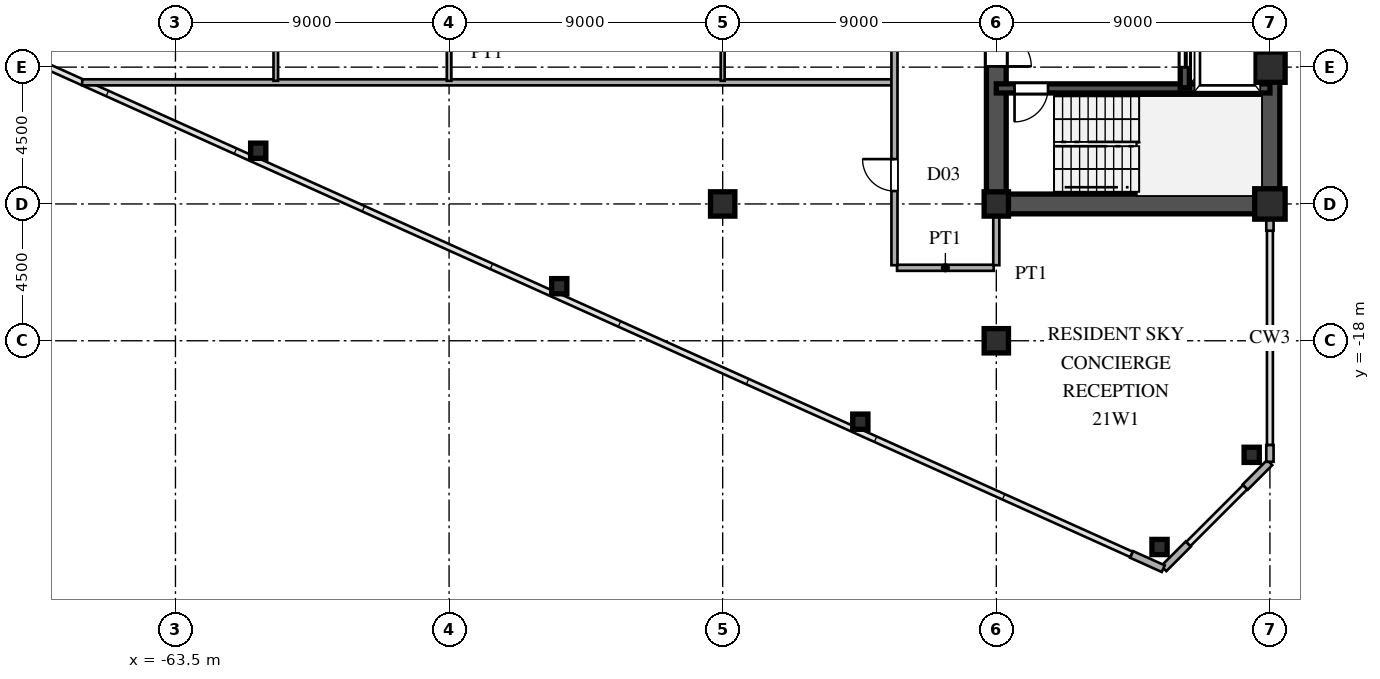
"""IFC4 building model, lengths in metres.
Left out: names, types, materials, properties, quantities, classifications, styles, units other than length and angle.
Written with IfcOpenShell. Run it as: python <this file> out.ifc"""

import sys

from ifc_helpers import new_model, si_unit, direction, frame, frame_2d, origin, origin_2d, place, context, subcontext, project, spatial, rectangle, hollow_rectangle, i_section, extrude, source, transform, mapped, element, fill, save


model = new_model("IFC4")
c1 = context("Model", 3, precision=1e-05, world=origin(), true_north=direction((0.0, 1.0)))
c2 = subcontext(c1, "Body", "Model", "MODEL_VIEW")
j1 = project(units=[si_unit("LENGTHUNIT", "METRE"), si_unit("PLANEANGLEUNIT", "RADIAN")], contexts=[c1])
p1 = place(None, origin())
s1 = spatial("IfcSite", under=j1, at=p1, CompositionType="ELEMENT")
p2 = place(p1, origin())
s2 = spatial("IfcBuilding", under=s1, at=p2, CompositionType="ELEMENT")
p3 = place(p2, frame((0.0, 0.0, 80.1)))
s3 = spatial("IfcBuildingStorey", under=s2, at=p3, CompositionType="ELEMENT", Elevation=80.1)
m1 = source(origin(), c2, "Body", "SweptSolid", [
    extrude(hollow_rectangle(XDim=1.0, YDim=1.0, WallThickness=0.042, at=origin_2d()), origin(), (0.0, 0.0, 1.0), 3.6),
])
for number, where, z_axis, x_axis in (
    (1, (-27.5, -13.5, 0.0), (0.0, 0.0, 1.0), (1.0, 0.0, 0.0)),
    (2, (-27.5, -9.0, 0.0), (0.0, 0.0, 1.0), (1.0, 0.0, 0.0)),
):
    element("IfcColumn", number, at=place(p3, frame(where, z_axis=z_axis, x_axis=x_axis)), inside=s3, PredefinedType="COLUMN", context=c2, shape_type="MappedRepresentation", body=[
        mapped(m1, transform((0.0, 0.0, 0.0), scale=1.0)),
    ])
m2 = source(origin(), c2, "Body", "SweptSolid", [
    extrude(i_section(OverallWidth=0.8, OverallDepth=0.8, WebThickness=0.032, FlangeThickness=0.05, at=origin_2d()), origin(), (0.0, 0.0, 1.0), 3.6),
])
for number, where, z_axis, x_axis in (
    (3, (-36.5, -18.0, 0.0), (0.0, 0.0, 1.0), (1.0, 0.0, 0.0)),
    (4, (-36.5, -13.5, 0.0), (0.0, 0.0, 1.0), (1.0, 0.0, 0.0)),
    (5, (-45.5, -13.5, 0.0), (0.0, 0.0, 1.0), (1.0, 0.0, 0.0)),
):
    element("IfcColumn", number, at=place(p3, frame(where, z_axis=z_axis, x_axis=x_axis)), inside=s3, PredefinedType="COLUMN", context=c2, shape_type="MappedRepresentation", body=[
        mapped(m2, transform((0.0, 0.0, 0.0), scale=1.0)),
    ])
m3 = source(origin(), c2, "Body", "SweptSolid", [
    extrude(hollow_rectangle(XDim=0.5, YDim=0.5, WallThickness=0.02, at=origin_2d()), origin(), (0.0, 0.0, 1.0), 3.6),
])
for number, where, z_axis, x_axis in (
    (6, (-28.1, -21.751, 0.0), (0.0, 0.0, 1.0), (1.0, 0.0, 0.0)),
    (7, (-31.131, -24.783, 0.0), (0.0, 0.0, 1.0), (1.0, 0.0, 0.0)),
    (8, (-40.973, -20.661, 0.0), (0.0, 0.0, 1.0), (1.0, 0.0, 0.0)),
    (9, (-50.875, -16.205, 0.0), (0.0, 0.0, 1.0), (1.0, 0.0, 0.0)),
    (10, (-60.778, -11.749, 0.0), (0.0, 0.0, 1.0), (1.0, 0.0, 0.0)),
):
    element("IfcColumn", number, at=place(p3, frame(where, z_axis=z_axis, x_axis=x_axis)), inside=s3, PredefinedType="COLUMN", context=c2, shape_type="MappedRepresentation", body=[
        mapped(m3, transform((0.0, 0.0, 0.0), scale=1.0)),
    ])
p4 = place(p3, frame((-27.5, -21.98, 0.0), z_axis=(0.0, 0.0, 1.0), x_axis=(0.0, 1.0, 0.0)))
e11 = element("IfcWall", 11, at=p4, inside=s3, PredefinedType="SOLIDWALL", context=c2, shape_type="SweptSolid", body=[
    extrude(rectangle(XDim=0.55, YDim=0.24, at=frame_2d((0.275, 0.0))), origin(), (0.0, 0.0, 1.0), 3.38),
])
p5 = place(p3, frame((-27.5, -14.38, 0.0), z_axis=(0.0, 0.0, 1.0), x_axis=(0.0, 1.0, 0.0)))
e12 = element("IfcWall", 12, at=p5, inside=s3, PredefinedType="SOLIDWALL", context=c2, shape_type="SweptSolid", body=[
    extrude(rectangle(XDim=0.55, YDim=0.24, at=frame_2d((0.275, 0.0))), origin(), (0.0, 0.0, 1.0), 2.88),
])
p6 = place(p3, frame((-32.049, -25.028, 0.0), z_axis=(0.0, 0.0, 1.0), x_axis=(0.911929519623, -0.410346866979, 0.0)))
e13 = element("IfcWall", 13, at=p6, inside=s3, PredefinedType="SOLIDWALL", context=c2, shape_type="SweptSolid", body=[
    extrude(rectangle(XDim=1.14, YDim=0.24, at=frame_2d((0.57, 0.0))), origin(), (0.0, 0.0, 1.0), 3.38),
])
for number, where, z_axis, x_axis in (
    (14, (-30.993, -25.493, 0.0), (0.0, 0.0, 1.0), (0.707, 0.707, 0.0)),
    (15, (-28.313, -22.813, 0.0), (0.0, 0.0, 1.0), (0.707, 0.707, 0.0)),
):
    element("IfcWall", number, at=place(p3, frame(where, z_axis=z_axis, x_axis=x_axis)), inside=s3, PredefinedType="SOLIDWALL", context=c2, shape_type="SweptSolid", body=[
        extrude(rectangle(XDim=1.14, YDim=0.24, at=frame_2d((0.57, 0.0))), origin(), (0.0, 0.0, 1.0), 3.38),
    ])
p7 = place(p3, frame((-27.5, -13.5, 0.0), z_axis=(0.0, 0.0, 1.0), x_axis=(0.0, 1.0, 0.0)))
e16 = element("IfcWall", 16, at=p7, inside=s3, PredefinedType="SHEAR", context=c2, shape_type="SweptSolid", body=[
    extrude(rectangle(XDim=12.2, YDim=0.65, at=frame_2d((6.1, 0.0))), origin(), (0.0, 0.0, 1.0), 3.38),
])
p8 = place(p3, frame((-36.5, -13.5, 0.0), z_axis=(0.0, 0.0, 1.0), x_axis=(1.0, 0.0, 0.0)))
e17 = element("IfcWall", 17, at=p8, inside=s3, PredefinedType="SHEAR", context=c2, shape_type="SweptSolid", body=[
    extrude(rectangle(XDim=9.0, YDim=0.65, at=frame_2d((4.5, 0.0))), origin(), (0.0, 0.0, 1.0), 3.38),
])
p9 = place(p3, frame((-36.5, -13.65, 0.0), z_axis=(0.0, 0.0, 1.0), x_axis=(0.0, 1.0, 0.0)))
e18 = element("IfcWall", 18, at=p9, inside=s3, PredefinedType="SHEAR", context=c2, shape_type="SweptSolid", body=[
    extrude(rectangle(XDim=7.15, YDim=0.65, at=frame_2d((3.575, 0.0))), origin(), (0.0, 0.0, 1.0), 3.38),
])
p10 = place(p9, frame((4.675, 0.0, 0.0)))
e19 = element("IfcOpeningElement", 19, at=p10, cuts=e18, PredefinedType="OPENING", context=c2, shape_type="SweptSolid", body=[
    extrude(rectangle(XDim=1.15, YDim=2.2, at=frame_2d((0.575, 1.1))), frame((0.0, 0.335, 0.0), z_axis=(0.0, -1.0, 0.0), x_axis=(1.0, 0.0, 0.0)), (0.0, 0.0, 1.0), 0.67),
])
p11 = place(p3, frame((-36.5, -9.7, 0.0), z_axis=(0.0, 0.0, 1.0), x_axis=(1.0, 0.0, 0.0)))
e20 = element("IfcWall", 20, at=p11, inside=s3, PredefinedType="SHEAR", context=c2, shape_type="SweptSolid", body=[
    extrude(rectangle(XDim=9.0, YDim=0.3, at=frame_2d((4.5, 0.0))), origin(), (0.0, 0.0, 1.0), 3.38),
])
p12 = place(p11, frame((0.6, 0.0, 0.0)))
e21 = element("IfcOpeningElement", 21, at=p12, cuts=e20, PredefinedType="OPENING", context=c2, shape_type="SweptSolid", body=[
    extrude(rectangle(XDim=1.1, YDim=2.2, at=frame_2d((0.55, 1.1))), frame((0.0, 0.16, 0.0), z_axis=(0.0, -1.0, 0.0), x_axis=(1.0, 0.0, 0.0)), (0.0, 0.0, 1.0), 0.32),
])
p13 = place(p3, frame((-30.3, -9.68, 0.0), z_axis=(0.0, 0.0, 1.0), x_axis=(0.0, 1.0, 0.0)))
e22 = element("IfcWall", 22, at=p13, inside=s3, PredefinedType="SHEAR", context=c2, shape_type="SweptSolid", body=[
    extrude(rectangle(XDim=2.56, YDim=0.3, at=frame_2d((1.28, 0.0))), origin(), (0.0, 0.0, 1.0), 3.38),
])
p14 = place(p13, frame((0.68, 0.0, 0.0)))
e23 = element("IfcOpeningElement", 23, at=p14, cuts=e22, PredefinedType="OPENING", context=c2, shape_type="SweptSolid", body=[
    extrude(rectangle(XDim=1.2, YDim=2.25, at=frame_2d((0.6, 1.125))), frame((0.0, 0.16, 0.0), z_axis=(0.0, -1.0, 0.0), x_axis=(1.0, 0.0, 0.0)), (0.0, 0.0, 1.0), 0.32),
])
p15 = place(p3, frame((-39.765, -15.6, 0.0), z_axis=(0.0, 0.0, 1.0), x_axis=(1.0, 0.0, 0.0)))
e24 = element("IfcWall", 24, at=p15, inside=s3, PredefinedType="PARTITIONING", context=c2, shape_type="SweptSolid", body=[
    extrude(rectangle(XDim=3.18, YDim=0.2, at=frame_2d((1.59, 0.0))), origin(), (0.0, 0.0, 1.0), 3.38),
])
p16 = place(p3, frame((-66.568, -9.5, 0.0), z_axis=(0.0, 0.0, 1.0), x_axis=(1.0, 0.0, 0.0)))
e25 = element("IfcWall", 25, at=p16, inside=s3, PredefinedType="PARTITIONING", context=c2, shape_type="SweptSolid", body=[
    extrude(rectangle(XDim=26.638, YDim=0.2, at=frame_2d((13.319, 0.0))), origin(), (0.0, 0.0, 1.0), 3.38),
])
p17 = place(p3, frame((-60.2, -9.45, 0.0), z_axis=(0.0, 0.0, 1.0), x_axis=(0.0, 1.0, 0.0)))
e26 = element("IfcWall", 26, at=p17, inside=s3, PredefinedType="PARTITIONING", context=c2, shape_type="SweptSolid", body=[
    extrude(rectangle(XDim=18.725, YDim=0.15, at=frame_2d((9.362, 0.0))), origin(), (0.0, 0.0, 1.0), 3.38),
])
p18 = place(p17, frame((1.808, 0.0, 0.0)))
e27 = element("IfcOpeningElement", 27, at=p18, cuts=e26, PredefinedType="OPENING", context=c2, shape_type="SweptSolid", body=[
    extrude(rectangle(XDim=0.95, YDim=2.15, at=frame_2d((0.475, 1.075))), frame((0.0, 0.085, 0.0), z_axis=(0.0, -1.0, 0.0), x_axis=(1.0, 0.0, 0.0)), (0.0, 0.0, 1.0), 0.17),
])
p19 = place(p17, frame((6.475, 0.0, 0.0)))
e28 = element("IfcOpeningElement", 28, at=p19, cuts=e26, PredefinedType="OPENING", context=c2, shape_type="SweptSolid", body=[
    extrude(rectangle(XDim=0.95, YDim=2.15, at=frame_2d((0.475, 1.075))), frame((0.0, 0.085, 0.0), z_axis=(0.0, -1.0, 0.0), x_axis=(1.0, 0.0, 0.0)), (0.0, 0.0, 1.0), 0.17),
])
p20 = place(p17, frame((11.142, 0.0, 0.0)))
e29 = element("IfcOpeningElement", 29, at=p20, cuts=e26, PredefinedType="OPENING", context=c2, shape_type="SweptSolid", body=[
    extrude(rectangle(XDim=0.95, YDim=2.15, at=frame_2d((0.475, 1.075))), frame((0.0, 0.085, 0.0), z_axis=(0.0, -1.0, 0.0), x_axis=(1.0, 0.0, 0.0)), (0.0, 0.0, 1.0), 0.17),
])
p21 = place(p17, frame((15.887, 0.0, 0.0)))
e30 = element("IfcOpeningElement", 30, at=p21, cuts=e26, PredefinedType="OPENING", context=c2, shape_type="SweptSolid", body=[
    extrude(rectangle(XDim=0.95, YDim=2.15, at=frame_2d((0.475, 1.075))), frame((0.0, 0.085, 0.0), z_axis=(0.0, -1.0, 0.0), x_axis=(1.0, 0.0, 0.0)), (0.0, 0.0, 1.0), 0.17),
])
p22 = place(p3, frame((-54.5, -9.45, 0.0), z_axis=(0.0, 0.0, 1.0), x_axis=(0.0, 1.0, 0.0)))
e31 = element("IfcWall", 31, at=p22, inside=s3, PredefinedType="PARTITIONING", context=c2, shape_type="SweptSolid", body=[
    extrude(rectangle(XDim=23.55, YDim=0.15, at=frame_2d((11.775, 0.0))), origin(), (0.0, 0.0, 1.0), 2.68),
])
p23 = place(p22, frame((6.475, 0.0, 0.0)))
e32 = element("IfcOpeningElement", 32, at=p23, cuts=e31, PredefinedType="OPENING", context=c2, shape_type="SweptSolid", body=[
    extrude(rectangle(XDim=0.95, YDim=2.15, at=frame_2d((0.475, 1.075))), frame((0.0, 0.085, 0.0), z_axis=(0.0, -1.0, 0.0), x_axis=(1.0, 0.0, 0.0)), (0.0, 0.0, 1.0), 0.17),
])
p24 = place(p22, frame((20.712, 0.0, 0.0)))
e33 = element("IfcOpeningElement", 33, at=p24, cuts=e31, PredefinedType="OPENING", context=c2, shape_type="SweptSolid", body=[
    extrude(rectangle(XDim=0.95, YDim=2.15, at=frame_2d((0.475, 1.075))), frame((0.0, 0.085, 0.0), z_axis=(0.0, -1.0, 0.0), x_axis=(1.0, 0.0, 0.0)), (0.0, 0.0, 1.0), 0.17),
])
p25 = place(p22, frame((15.887, 0.0, 0.0)))
e34 = element("IfcOpeningElement", 34, at=p25, cuts=e31, PredefinedType="OPENING", context=c2, shape_type="SweptSolid", body=[
    extrude(rectangle(XDim=0.95, YDim=2.15, at=frame_2d((0.475, 1.075))), frame((0.0, 0.085, 0.0), z_axis=(0.0, -1.0, 0.0), x_axis=(1.0, 0.0, 0.0)), (0.0, 0.0, 1.0), 0.17),
])
p26 = place(p3, frame((-45.5, -9.45, 0.0), z_axis=(0.0, 0.0, 1.0), x_axis=(0.0, 1.0, 0.0)))
e35 = element("IfcWall", 35, at=p26, inside=s3, PredefinedType="PARTITIONING", context=c2, shape_type="SweptSolid", body=[
    extrude(rectangle(XDim=9.233, YDim=0.13, at=frame_2d((4.616, 0.0))), origin(), (0.0, 0.0, 1.0), 2.68),
])
p27 = place(p26, frame((6.475, 0.0, 0.0)))
e36 = element("IfcOpeningElement", 36, at=p27, cuts=e35, PredefinedType="OPENING", context=c2, shape_type="SweptSolid", body=[
    extrude(rectangle(XDim=0.95, YDim=2.15, at=frame_2d((0.475, 1.075))), frame((0.0, 0.075, 0.0), z_axis=(0.0, -1.0, 0.0), x_axis=(1.0, 0.0, 0.0)), (0.0, 0.0, 1.0), 0.15),
])
p28 = place(p3, frame((-39.85, -15.515, 0.0), z_axis=(0.0, 0.0, 1.0), x_axis=(0.0, 1.0, 0.0)))
e37 = element("IfcWall", 37, at=p28, inside=s3, PredefinedType="PARTITIONING", context=c2, shape_type="SweptSolid", body=[
    extrude(rectangle(XDim=31.03, YDim=0.2, at=frame_2d((15.515, 0.0))), origin(), (0.0, 0.0, 1.0), 3.38),
])
p29 = place(p28, frame((2.44, 0.0, 0.0)))
e38 = element("IfcOpeningElement", 38, at=p29, cuts=e37, PredefinedType="OPENING", context=c2, shape_type="SweptSolid", body=[
    extrude(rectangle(XDim=1.05, YDim=2.25, at=frame_2d((0.525, 1.125))), frame((0.0, 0.11, 0.0), z_axis=(0.0, -1.0, 0.0), x_axis=(1.0, 0.0, 0.0)), (0.0, 0.0, 1.0), 0.22),
])
p30 = place(p28, frame((12.28, 0.0, 0.0)))
e39 = element("IfcOpeningElement", 39, at=p30, cuts=e37, PredefinedType="OPENING", context=c2, shape_type="SweptSolid", body=[
    extrude(rectangle(XDim=1.05, YDim=2.25, at=frame_2d((0.525, 1.125))), frame((0.0, 0.11, 0.0), z_axis=(0.0, -1.0, 0.0), x_axis=(1.0, 0.0, 0.0)), (0.0, 0.0, 1.0), 0.22),
])
p31 = place(p28, frame((25.067, 0.0, 0.0)))
e40 = element("IfcOpeningElement", 40, at=p31, cuts=e37, PredefinedType="OPENING", context=c2, shape_type="SweptSolid", body=[
    extrude(rectangle(XDim=1.05, YDim=2.25, at=frame_2d((0.525, 1.125))), frame((0.0, 0.11, 0.0), z_axis=(0.0, -1.0, 0.0), x_axis=(1.0, 0.0, 0.0)), (0.0, 0.0, 1.0), 0.22),
])
p32 = place(p3, frame((-36.5, -15.515, 0.0), z_axis=(0.0, 0.0, 1.0), x_axis=(0.0, 1.0, 0.0)))
e41 = element("IfcWall", 41, at=p32, inside=s3, PredefinedType="PARTITIONING", context=c2, shape_type="SweptSolid", body=[
    extrude(rectangle(XDim=1.685, YDim=0.2, at=frame_2d((0.842, 0.0))), origin(), (0.0, 0.0, 1.0), 2.68),
])
m4 = source(origin(), c2, "Body", "SweptSolid", [
    extrude(rectangle(XDim=1.15, YDim=2.2, at=frame_2d((0.575, 1.1))), frame((0.0, 0.025, 0.0), z_axis=(0.0, -1.0, 0.0), x_axis=(1.0, 0.0, 0.0)), (0.0, 0.0, 1.0), 0.05),
])
p33 = place(p10, frame((1.15, 0.0, 0.0), z_axis=(0.0, 0.0, 1.0), x_axis=(-1.0, 0.0, 0.0)))
e42 = element("IfcDoor", 42, at=p33, inside=s3, OperationType="SINGLE_SWING_LEFT", PredefinedType="DOOR", context=c2, shape_type="MappedRepresentation", body=[
    mapped(m4, transform((0.0, 0.0, 0.0), scale=1.0)),
])
fill(e19, e42)
m5 = source(origin(), c2, "Body", "SweptSolid", [
    extrude(rectangle(XDim=1.1, YDim=2.2, at=frame_2d((0.55, 1.1))), frame((0.0, 0.025, 0.0), z_axis=(0.0, -1.0, 0.0), x_axis=(1.0, 0.0, 0.0)), (0.0, 0.0, 1.0), 0.05),
])
p34 = place(p12, frame((1.1, 0.0, 0.0), z_axis=(0.0, 0.0, 1.0), x_axis=(-1.0, 0.0, 0.0)))
e43 = element("IfcDoor", 43, at=p34, inside=s3, OperationType="SINGLE_SWING_LEFT", PredefinedType="DOOR", context=c2, shape_type="MappedRepresentation", body=[
    mapped(m5, transform((0.0, 0.0, 0.0), scale=1.0)),
])
fill(e21, e43)
m6 = source(origin(), c2, "Body", "SweptSolid", [
    extrude(rectangle(XDim=1.2, YDim=2.25, at=frame_2d((0.6, 1.125))), frame((0.0, 0.025, 0.0), z_axis=(0.0, -1.0, 0.0), x_axis=(1.0, 0.0, 0.0)), (0.0, 0.0, 1.0), 0.05),
])
p35 = place(p14, origin())
e44 = element("IfcDoor", 44, at=p35, inside=s3, OperationType="DOUBLE_DOOR_SLIDING", PredefinedType="DOOR", context=c2, shape_type="MappedRepresentation", body=[
    mapped(m6, transform((0.0, 0.0, 0.0), scale=1.0)),
])
fill(e23, e44)
m7 = source(origin(), c2, "Body", "SweptSolid", [
    extrude(rectangle(XDim=1.05, YDim=2.25, at=frame_2d((0.525, 1.125))), frame((0.0, 0.025, 0.0), z_axis=(0.0, -1.0, 0.0), x_axis=(1.0, 0.0, 0.0)), (0.0, 0.0, 1.0), 0.05),
])
p36 = place(p29, origin())
e45 = element("IfcDoor", 45, at=p36, inside=s3, OperationType="SINGLE_SWING_RIGHT", PredefinedType="DOOR", context=c2, shape_type="MappedRepresentation", body=[
    mapped(m7, transform((0.0, 0.0, 0.0), scale=1.0)),
])
fill(e38, e45)
save(model, sys.argv[1])
